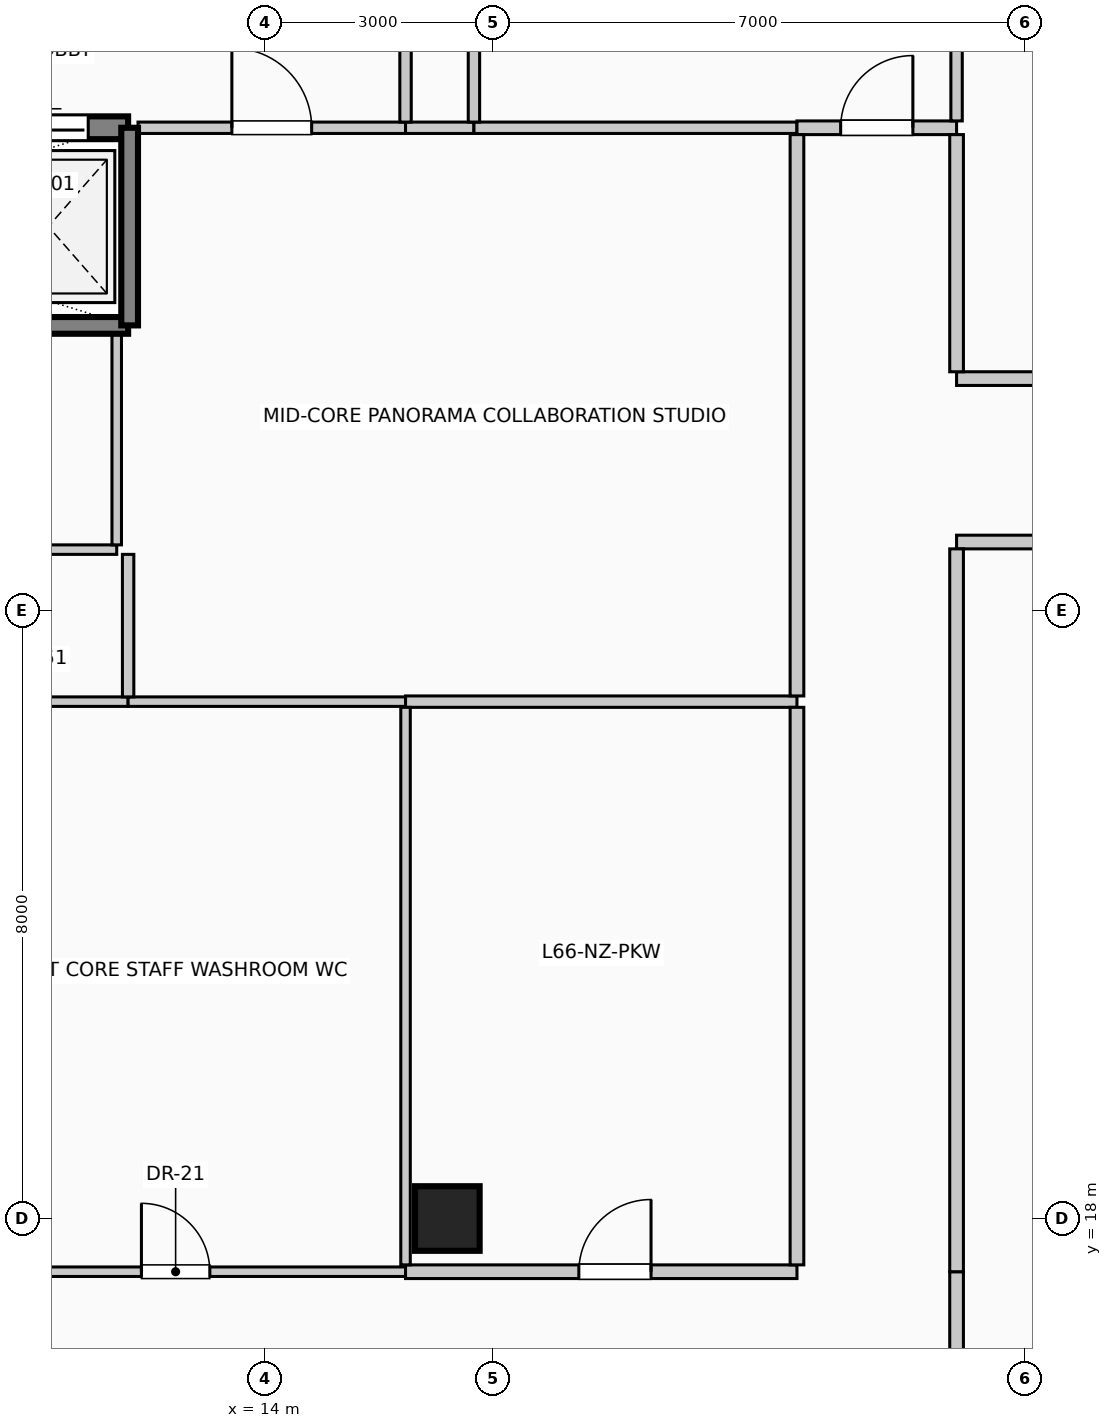
"""IFC4 building model, lengths in metres.
Left out: names, types, materials, properties, quantities, classifications, styles, units other than length and angle.
Written with IfcOpenShell. Run it as: python <this file> out.ifc"""

import sys

from ifc_helpers import new_model, si_unit, direction, frame, frame_2d, origin, origin_2d, place, context, subcontext, project, spatial, rectangle, circle, extrude, element, fill, save


model = new_model("IFC4")
c1 = context("Model", 3, precision=1e-05, world=origin(), true_north=direction((0.0, 1.0)))
c2 = subcontext(c1, "Body", "Model", "MODEL_VIEW")
j1 = project(units=[si_unit("LENGTHUNIT", "METRE"), si_unit("PLANEANGLEUNIT", "RADIAN")], contexts=[c1])
p1 = place(None, origin())
s1 = spatial("IfcSite", under=j1, at=p1, CompositionType="ELEMENT")
p2 = place(p1, origin())
s2 = spatial("IfcBuilding", under=s1, at=p2, CompositionType="ELEMENT")
p3 = place(p2, frame((0.0, 0.0, 272.6)))
s3 = spatial("IfcBuildingStorey", under=s2, at=p3, CompositionType="ELEMENT", Elevation=272.6)
p4 = place(p3, frame((16.4, 18.0, 0.0), z_axis=(0.0, 0.0, 1.0), x_axis=(1.0, 0.0, 0.0)))
e1 = element("IfcColumn", 1, at=p4, inside=s3, PredefinedType="COLUMN", context=c2, shape_type="SweptSolid", body=[
    extrude(circle(Radius=0.425, at=origin_2d()), origin(), (0.0, 0.0, 1.0), 4.0),
])
p5 = place(p3, frame((10.05, 32.35, 0.0), z_axis=(0.0, 0.0, 1.0), x_axis=(1.0, 0.0, 0.0)))
e2 = element("IfcWall", 2, at=p5, inside=s3, PredefinedType="SOLIDWALL", context=c2, shape_type="SweptSolid", body=[
    extrude(rectangle(XDim=2.15, YDim=0.3, at=frame_2d((1.075, 0.0))), origin(), (0.0, 0.0, 1.0), 4.0),
])
p6 = place(p5, frame((0.525, 0.0, 0.0)))
e3 = element("IfcOpeningElement", 3, at=p6, cuts=e2, PredefinedType="OPENING", context=c2, shape_type="SweptSolid", body=[
    extrude(rectangle(XDim=1.1, YDim=2.2, at=frame_2d((0.55, 1.1))), frame((0.0, 0.16, 0.0), z_axis=(0.0, -1.0, 0.0), x_axis=(1.0, 0.0, 0.0)), (0.0, 0.0, 1.0), 0.32),
])
p7 = place(p3, frame((3.55, 29.75, 0.0), z_axis=(0.0, 0.0, 1.0), x_axis=(1.0, 0.0, 0.0)))
e4 = element("IfcWall", 4, at=p7, inside=s3, PredefinedType="SOLIDWALL", context=c2, shape_type="SweptSolid", body=[
    extrude(rectangle(XDim=8.65, YDim=0.22, at=frame_2d((4.325, 0.0))), origin(), (0.0, 0.0, 1.0), 4.0),
])
p8 = place(p3, frame((12.22, 29.75, 0.0), z_axis=(0.0, 0.0, 1.0), x_axis=(0.0, 1.0, 0.0)))
e5 = element("IfcWall", 5, at=p8, inside=s3, PredefinedType="SOLIDWALL", context=c2, shape_type="SweptSolid", body=[
    extrude(rectangle(XDim=2.6, YDim=0.22, at=frame_2d((1.3, 0.0))), origin(), (0.0, 0.0, 1.0), 4.0),
])
p9 = place(p3, frame((9.8, 17.3, 0.0), z_axis=(0.0, 0.0, 1.0), x_axis=(1.0, 0.0, 0.0)))
e6 = element("IfcWall", 6, at=p9, inside=s3, PredefinedType="PARTITIONING", context=c2, shape_type="SweptSolid", body=[
    extrude(rectangle(XDim=6.05, YDim=0.125, at=frame_2d((3.025, 0.0))), origin(), (0.0, 0.0, 1.0), 3.75),
])
p10 = place(p9, frame((2.575, 0.0, 0.0)))
e7 = element("IfcOpeningElement", 7, at=p10, cuts=e6, PredefinedType="OPENING", context=c2, shape_type="SweptSolid", body=[
    extrude(rectangle(XDim=0.9, YDim=2.1, at=frame_2d((0.45, 1.05))), frame((0.0, 0.073, 0.0), z_axis=(0.0, -1.0, 0.0), x_axis=(1.0, 0.0, 0.0)), (0.0, 0.0, 1.0), 0.145),
])
p11 = place(p3, frame((15.85, 17.3, 0.0), z_axis=(0.0, 0.0, 1.0), x_axis=(1.0, 0.0, 0.0)))
e8 = element("IfcWall", 8, at=p11, inside=s3, PredefinedType="PARTITIONING", context=c2, shape_type="SweptSolid", body=[
    extrude(rectangle(XDim=5.15, YDim=0.18, at=frame_2d((2.575, 0.0))), origin(), (0.0, 0.0, 1.0), 3.75),
])
p12 = place(p11, frame((2.28, 0.0, 0.0)))
e9 = element("IfcOpeningElement", 9, at=p12, cuts=e8, PredefinedType="OPENING", context=c2, shape_type="SweptSolid", body=[
    extrude(rectangle(XDim=0.95, YDim=2.15, at=frame_2d((0.475, 1.075))), frame((0.0, 0.1, 0.0), z_axis=(0.0, -1.0, 0.0), x_axis=(1.0, 0.0, 0.0)), (0.0, 0.0, 1.0), 0.2),
])
p13 = place(p3, frame((9.8, 24.8, 0.0), z_axis=(0.0, 0.0, 1.0), x_axis=(1.0, 0.0, 0.0)))
e10 = element("IfcWall", 10, at=p13, inside=s3, PredefinedType="PARTITIONING", context=c2, shape_type="SweptSolid", body=[
    extrude(rectangle(XDim=2.4, YDim=0.125, at=frame_2d((1.2, 0.0))), origin(), (0.0, 0.0, 1.0), 3.75),
])
p14 = place(p3, frame((12.2, 24.8, 0.0), z_axis=(0.0, 0.0, 1.0), x_axis=(1.0, 0.0, 0.0)))
e11 = element("IfcWall", 11, at=p14, inside=s3, PredefinedType="PARTITIONING", context=c2, shape_type="SweptSolid", body=[
    extrude(rectangle(XDim=3.65, YDim=0.125, at=frame_2d((1.825, 0.0))), origin(), (0.0, 0.0, 1.0), 3.75),
])
p15 = place(p3, frame((15.85, 24.8, 0.0), z_axis=(0.0, 0.0, 1.0), x_axis=(1.0, 0.0, 0.0)))
e12 = element("IfcWall", 12, at=p15, inside=s3, PredefinedType="PARTITIONING", context=c2, shape_type="SweptSolid", body=[
    extrude(rectangle(XDim=5.15, YDim=0.15, at=frame_2d((2.575, 0.0))), origin(), (0.0, 0.0, 1.0), 3.75),
])
p16 = place(p3, frame((7.89, 26.8, 0.0), z_axis=(0.0, 0.0, 1.0), x_axis=(1.0, 0.0, 0.0)))
e13 = element("IfcWall", 13, at=p16, inside=s3, PredefinedType="PARTITIONING", context=c2, shape_type="SweptSolid", body=[
    extrude(rectangle(XDim=4.16, YDim=0.125, at=frame_2d((2.08, 0.0))), origin(), (0.0, 0.0, 1.0), 3.75),
])
p17 = place(p16, frame((1.62, 0.0, 0.0)))
e14 = element("IfcOpeningElement", 14, at=p17, cuts=e13, PredefinedType="OPENING", context=c2, shape_type="SweptSolid", body=[
    extrude(rectangle(XDim=0.92, YDim=2.1, at=frame_2d((0.46, 1.05))), frame((0.0, 0.073, 0.0), z_axis=(0.0, -1.0, 0.0), x_axis=(1.0, 0.0, 0.0)), (0.0, 0.0, 1.0), 0.145),
])
p18 = place(p3, frame((23.1, 26.9, 0.0), z_axis=(0.0, 0.0, 1.0), x_axis=(1.0, 0.0, 0.0)))
e15 = element("IfcWall", 15, at=p18, inside=s3, PredefinedType="PARTITIONING", context=c2, shape_type="SweptSolid", body=[
    extrude(rectangle(XDim=14.02, YDim=0.18, at=frame_2d((7.01, 0.0))), origin(), (0.0, 0.0, 1.0), 3.75),
])
p19 = place(p18, frame((6.535, 0.0, 0.0)))
e16 = element("IfcOpeningElement", 16, at=p19, cuts=e15, PredefinedType="OPENING", context=c2, shape_type="SweptSolid", body=[
    extrude(rectangle(XDim=0.95, YDim=2.15, at=frame_2d((0.475, 1.075))), frame((0.0, 0.1, 0.0), z_axis=(0.0, -1.0, 0.0), x_axis=(1.0, 0.0, 0.0)), (0.0, 0.0, 1.0), 0.2),
])
p20 = place(p3, frame((23.1, 29.05, 0.0), z_axis=(0.0, 0.0, 1.0), x_axis=(1.0, 0.0, 0.0)))
e17 = element("IfcWall", 17, at=p20, inside=s3, PredefinedType="PARTITIONING", context=c2, shape_type="SweptSolid", body=[
    extrude(rectangle(XDim=5.56, YDim=0.18, at=frame_2d((2.78, 0.0))), origin(), (0.0, 0.0, 1.0), 3.75),
])
p21 = place(p20, frame((2.305, 0.0, 0.0)))
e18 = element("IfcOpeningElement", 18, at=p21, cuts=e17, PredefinedType="OPENING", context=c2, shape_type="SweptSolid", body=[
    extrude(rectangle(XDim=0.95, YDim=2.15, at=frame_2d((0.475, 1.075))), frame((0.0, 0.1, 0.0), z_axis=(0.0, -1.0, 0.0), x_axis=(1.0, 0.0, 0.0)), (0.0, 0.0, 1.0), 0.2),
])
p22 = place(p3, frame((12.33, 32.35, 0.0), z_axis=(0.0, 0.0, 1.0), x_axis=(1.0, 0.0, 0.0)))
e19 = element("IfcWall", 19, at=p22, inside=s3, PredefinedType="PARTITIONING", context=c2, shape_type="SweptSolid", body=[
    extrude(rectangle(XDim=3.52, YDim=0.15, at=frame_2d((1.76, 0.0))), origin(), (0.0, 0.0, 1.0), 3.75),
])
p23 = place(p22, frame((1.235, 0.0, 0.0)))
e20 = element("IfcOpeningElement", 20, at=p23, cuts=e19, PredefinedType="OPENING", context=c2, shape_type="SweptSolid", body=[
    extrude(rectangle(XDim=1.05, YDim=2.15, at=frame_2d((0.525, 1.075))), frame((0.0, 0.085, 0.0), z_axis=(0.0, -1.0, 0.0), x_axis=(1.0, 0.0, 0.0)), (0.0, 0.0, 1.0), 0.17),
])
p24 = place(p3, frame((15.85, 32.35, 0.0), z_axis=(0.0, 0.0, 1.0), x_axis=(1.0, 0.0, 0.0)))
e21 = element("IfcWall", 21, at=p24, inside=s3, PredefinedType="PARTITIONING", context=c2, shape_type="SweptSolid", body=[
    extrude(rectangle(XDim=0.9, YDim=0.15, at=frame_2d((0.45, 0.0))), origin(), (0.0, 0.0, 1.0), 3.75),
])
p25 = place(p3, frame((16.75, 32.35, 0.0), z_axis=(0.0, 0.0, 1.0), x_axis=(1.0, 0.0, 0.0)))
e22 = element("IfcWall", 22, at=p25, inside=s3, PredefinedType="PARTITIONING", context=c2, shape_type="SweptSolid", body=[
    extrude(rectangle(XDim=4.25, YDim=0.15, at=frame_2d((2.125, 0.0))), origin(), (0.0, 0.0, 1.0), 3.75),
])
p26 = place(p3, frame((21.0, 32.35, 0.0), z_axis=(0.0, 0.0, 1.0), x_axis=(1.0, 0.0, 0.0)))
e23 = element("IfcWall", 23, at=p26, inside=s3, PredefinedType="PARTITIONING", context=c2, shape_type="SweptSolid", body=[
    extrude(rectangle(XDim=2.1, YDim=0.18, at=frame_2d((1.05, 0.0))), origin(), (0.0, 0.0, 1.0), 3.75),
])
p27 = place(p26, frame((0.575, 0.0, 0.0)))
e24 = element("IfcOpeningElement", 24, at=p27, cuts=e23, PredefinedType="OPENING", context=c2, shape_type="SweptSolid", body=[
    extrude(rectangle(XDim=0.95, YDim=2.15, at=frame_2d((0.475, 1.075))), frame((0.0, 0.1, 0.0), z_axis=(0.0, -1.0, 0.0), x_axis=(1.0, 0.0, 0.0)), (0.0, 0.0, 1.0), 0.2),
])
p28 = place(p3, frame((12.05, 26.863, 0.0), z_axis=(0.0, 0.0, 1.0), x_axis=(0.0, 1.0, 0.0)))
e25 = element("IfcWall", 25, at=p28, inside=s3, PredefinedType="PARTITIONING", context=c2, shape_type="SweptSolid", body=[
    extrude(rectangle(XDim=2.777, YDim=0.125, at=frame_2d((1.389, 0.0))), origin(), (0.0, 0.0, 1.0), 3.75),
])
p29 = place(p3, frame((12.2, 24.863, 0.0), z_axis=(0.0, 0.0, 1.0), x_axis=(0.0, 1.0, 0.0)))
e26 = element("IfcWall", 26, at=p29, inside=s3, PredefinedType="PARTITIONING", context=c2, shape_type="SweptSolid", body=[
    extrude(rectangle(XDim=1.875, YDim=0.15, at=frame_2d((0.938, 0.0))), origin(), (0.0, 0.0, 1.0), 3.75),
])
p30 = place(p3, frame((15.85, 17.39, 0.0), z_axis=(0.0, 0.0, 1.0), x_axis=(0.0, 1.0, 0.0)))
e27 = element("IfcWall", 27, at=p30, inside=s3, PredefinedType="PARTITIONING", context=c2, shape_type="SweptSolid", body=[
    extrude(rectangle(XDim=7.335, YDim=0.125, at=frame_2d((3.667, 0.0))), origin(), (0.0, 0.0, 1.0), 3.75),
])
p31 = place(p3, frame((15.85, 32.425, 0.0), z_axis=(0.0, 0.0, 1.0), x_axis=(0.0, 1.0, 0.0)))
e28 = element("IfcWall", 28, at=p31, inside=s3, PredefinedType="PARTITIONING", context=c2, shape_type="SweptSolid", body=[
    extrude(rectangle(XDim=1.725, YDim=0.15, at=frame_2d((0.862, 0.0))), origin(), (0.0, 0.0, 1.0), 3.75),
])
p32 = place(p3, frame((16.75, 32.425, 0.0), z_axis=(0.0, 0.0, 1.0), x_axis=(0.0, 1.0, 0.0)))
e29 = element("IfcWall", 29, at=p32, inside=s3, PredefinedType="PARTITIONING", context=c2, shape_type="SweptSolid", body=[
    extrude(rectangle(XDim=1.15, YDim=0.15, at=frame_2d((0.575, 0.0))), origin(), (0.0, 0.0, 1.0), 3.75),
])
p33 = place(p3, frame((21.0, 17.39, 0.0), z_axis=(0.0, 0.0, 1.0), x_axis=(0.0, 1.0, 0.0)))
e30 = element("IfcWall", 30, at=p33, inside=s3, PredefinedType="PARTITIONING", context=c2, shape_type="SweptSolid", body=[
    extrude(rectangle(XDim=7.335, YDim=0.18, at=frame_2d((3.667, 0.0))), origin(), (0.0, 0.0, 1.0), 3.75),
])
p34 = place(p3, frame((21.0, 24.875, 0.0), z_axis=(0.0, 0.0, 1.0), x_axis=(0.0, 1.0, 0.0)))
e31 = element("IfcWall", 31, at=p34, inside=s3, PredefinedType="PARTITIONING", context=c2, shape_type="SweptSolid", body=[
    extrude(rectangle(XDim=7.385, YDim=0.18, at=frame_2d((3.692, 0.0))), origin(), (0.0, 0.0, 1.0), 3.75),
])
p35 = place(p3, frame((23.1, 15.29, 0.0), z_axis=(0.0, 0.0, 1.0), x_axis=(0.0, 1.0, 0.0)))
e32 = element("IfcWall", 32, at=p35, inside=s3, PredefinedType="PARTITIONING", context=c2, shape_type="SweptSolid", body=[
    extrude(rectangle(XDim=2.01, YDim=0.18, at=frame_2d((1.005, 0.0))), origin(), (0.0, 0.0, 1.0), 3.75),
])
p36 = place(p3, frame((23.1, 17.3, 0.0), z_axis=(0.0, 0.0, 1.0), x_axis=(0.0, 1.0, 0.0)))
e33 = element("IfcWall", 33, at=p36, inside=s3, PredefinedType="PARTITIONING", context=c2, shape_type="SweptSolid", body=[
    extrude(rectangle(XDim=9.51, YDim=0.18, at=frame_2d((4.755, 0.0))), origin(), (0.0, 0.0, 1.0), 3.75),
])
p37 = place(p3, frame((23.1, 29.14, 0.0), z_axis=(0.0, 0.0, 1.0), x_axis=(0.0, 1.0, 0.0)))
e34 = element("IfcWall", 34, at=p37, inside=s3, PredefinedType="PARTITIONING", context=c2, shape_type="SweptSolid", body=[
    extrude(rectangle(XDim=3.12, YDim=0.18, at=frame_2d((1.56, 0.0))), origin(), (0.0, 0.0, 1.0), 3.75),
])
p38 = place(p3, frame((23.1, 32.44, 0.0), z_axis=(0.0, 0.0, 1.0), x_axis=(0.0, 1.0, 0.0)))
e35 = element("IfcWall", 35, at=p38, inside=s3, PredefinedType="PARTITIONING", context=c2, shape_type="SweptSolid", body=[
    extrude(rectangle(XDim=12.84, YDim=0.15, at=frame_2d((6.42, 0.0))), origin(), (0.0, 0.0, 1.0), 3.75),
])
p39 = place(p6, origin())
e36 = element("IfcDoor", 36, at=p39, inside=s3, OperationType="SLIDING_TO_RIGHT", PredefinedType="DOOR", context=c2, shape_type="SweptSolid", body=[
    extrude(rectangle(XDim=1.1, YDim=2.2, at=frame_2d((0.55, 1.1))), frame((0.0, 0.025, 0.0), z_axis=(0.0, -1.0, 0.0), x_axis=(1.0, 0.0, 0.0)), (0.0, 0.0, 1.0), 0.05),
])
fill(e3, e36)
p40 = place(p10, origin())
e37 = element("IfcDoor", 37, at=p40, inside=s3, OperationType="SINGLE_SWING_LEFT", PredefinedType="DOOR", context=c2, shape_type="SweptSolid", body=[
    extrude(rectangle(XDim=0.9, YDim=2.1, at=frame_2d((0.45, 1.05))), frame((0.0, 0.025, 0.0), z_axis=(0.0, -1.0, 0.0), x_axis=(1.0, 0.0, 0.0)), (0.0, 0.0, 1.0), 0.05),
])
fill(e7, e37)
p41 = place(p12, origin())
e38 = element("IfcDoor", 38, at=p41, inside=s3, OperationType="SINGLE_SWING_RIGHT", PredefinedType="DOOR", context=c2, shape_type="SweptSolid", body=[
    extrude(rectangle(XDim=0.95, YDim=2.15, at=frame_2d((0.475, 1.075))), frame((0.0, 0.025, 0.0), z_axis=(0.0, -1.0, 0.0), x_axis=(1.0, 0.0, 0.0)), (0.0, 0.0, 1.0), 0.05),
])
fill(e9, e38)
p42 = place(p23, origin())
e39 = element("IfcDoor", 39, at=p42, inside=s3, OperationType="SINGLE_SWING_LEFT", PredefinedType="DOOR", context=c2, shape_type="SweptSolid", body=[
    extrude(rectangle(XDim=1.05, YDim=2.15, at=frame_2d((0.525, 1.075))), frame((0.0, 0.025, 0.0), z_axis=(0.0, -1.0, 0.0), x_axis=(1.0, 0.0, 0.0)), (0.0, 0.0, 1.0), 0.05),
])
fill(e20, e39)
p43 = place(p27, origin())
e40 = element("IfcDoor", 40, at=p43, inside=s3, OperationType="SINGLE_SWING_RIGHT", PredefinedType="DOOR", context=c2, shape_type="SweptSolid", body=[
    extrude(rectangle(XDim=0.95, YDim=2.15, at=frame_2d((0.475, 1.075))), frame((0.0, 0.025, 0.0), z_axis=(0.0, -1.0, 0.0), x_axis=(1.0, 0.0, 0.0)), (0.0, 0.0, 1.0), 0.05),
])
fill(e24, e40)
save(model, sys.argv[1])
